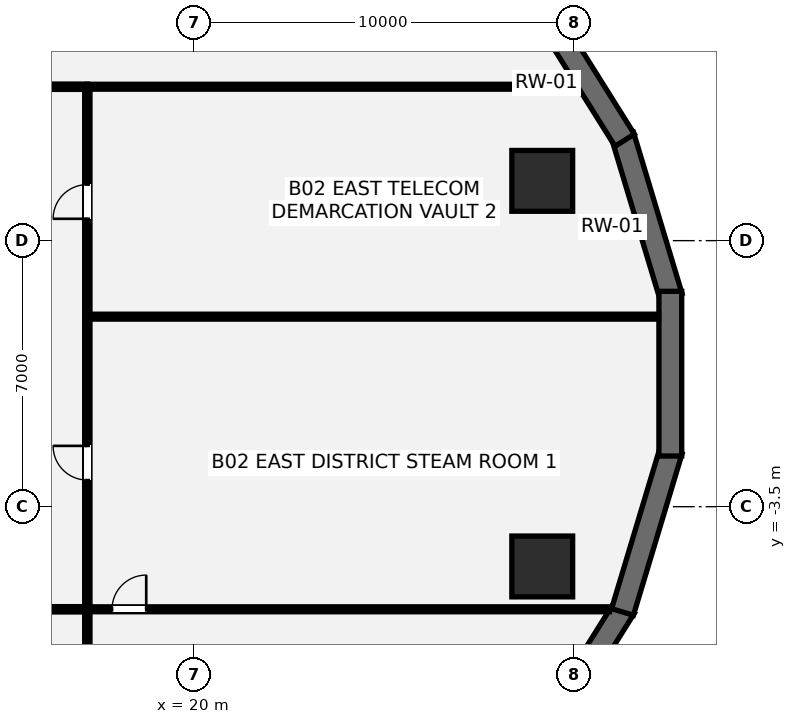
"""IFC4 building model, lengths in metres.
Left out: names, types, materials, properties, quantities, classifications, styles, units other than length and angle.
Written with IfcOpenShell. Run it as: python <this file> out.ifc"""

import sys

from ifc_helpers import new_model, si_unit, direction, frame, frame_2d, origin, origin_2d, place, context, subcontext, project, spatial, rectangle, hollow_circle, extrude, element, fill, save


model = new_model("IFC4")
c1 = context("Model", 3, precision=1e-05, world=origin(), true_north=direction((0.0, 1.0)))
c2 = subcontext(c1, "Body", "Model", "MODEL_VIEW")
j1 = project(units=[si_unit("LENGTHUNIT", "METRE"), si_unit("PLANEANGLEUNIT", "RADIAN")], contexts=[c1])
p1 = place(None, origin())
s1 = spatial("IfcSite", under=j1, at=p1, CompositionType="ELEMENT")
p2 = place(p1, origin())
s2 = spatial("IfcBuilding", under=s1, at=p2, CompositionType="ELEMENT")
p3 = place(p2, frame((0.0, 0.0, -8.8)))
s3 = spatial("IfcBuildingStorey", under=s2, at=p3, CompositionType="ELEMENT", Elevation=-8.8)
p4 = place(p3, frame((32.562, 2.021, 0.0), z_axis=(0.0, 0.0, 1.0), x_axis=(-0.288296686647, 0.95754113252, 0.0)))
e1 = element("IfcWall", 1, at=p4, inside=s3, PredefinedType="USERDEFINED", context=c2, shape_type="SweptSolid", body=[
    extrude(rectangle(XDim=4.438, YDim=0.6, at=frame_2d((2.219, 0.0))), origin(), (0.0, 0.0, 1.0), 4.4),
])
for number, where, z_axis, x_axis in (
    (2, (31.341, 6.143, 0.0), (0.0, 0.0, 1.0), (-0.531, 0.847, 0.0)),
    (3, (28.833, -10.142, 0.0), (0.0, 0.0, 1.0), (0.531, 0.847, 0.0)),
):
    element("IfcWall", number, at=place(p3, frame(where, z_axis=z_axis, x_axis=x_axis)), inside=s3, PredefinedType="USERDEFINED", context=c2, shape_type="SweptSolid", body=[
        extrude(rectangle(XDim=4.72, YDim=0.6, at=frame_2d((2.36, 0.0))), origin(), (0.0, 0.0, 1.0), 4.4),
    ])
p5 = place(p3, frame((31.283, -6.271, 0.0), z_axis=(0.0, 0.0, 1.0), x_axis=(0.288296686647, 0.95754113252, 0.0)))
e4 = element("IfcWall", 4, at=p5, inside=s3, PredefinedType="USERDEFINED", context=c2, shape_type="SweptSolid", body=[
    extrude(rectangle(XDim=4.438, YDim=0.6, at=frame_2d((2.219, 0.0))), origin(), (0.0, 0.0, 1.0), 4.4),
])
p6 = place(p3, frame((32.541, -2.167, 0.0), z_axis=(0.0, 0.0, 1.0), x_axis=(0.0, 1.0, 0.0)))
e5 = element("IfcWall", 5, at=p6, inside=s3, PredefinedType="USERDEFINED", context=c2, shape_type="SweptSolid", body=[
    extrude(rectangle(XDim=4.333, YDim=0.6, at=frame_2d((2.167, 0.0))), origin(), (0.0, 0.0, 1.0), 4.4),
])
for number, where, z_axis, x_axis in (
    (6, (29.171, 5.073, 0.0), (0.0, 0.0, 1.0), (1.0, 0.0, 0.0)),
    (7, (29.171, -5.073, 0.0), (0.0, 0.0, 1.0), (1.0, 0.0, 0.0)),
):
    element("IfcColumn", number, at=place(p3, frame(where, z_axis=z_axis, x_axis=x_axis)), inside=s3, PredefinedType="USERDEFINED", context=c2, shape_type="SweptSolid", body=[
        extrude(hollow_circle(Radius=0.8, WallThickness=0.06, at=origin_2d()), origin(), (0.0, 0.0, 1.0), 4.4),
    ])
p7 = place(p3, frame((-17.2, -6.2, 0.0), z_axis=(0.0, 0.0, 1.0), x_axis=(1.0, 0.0, 0.0)))
e8 = element("IfcWall", 8, at=p7, inside=s3, PredefinedType="PARTITIONING", context=c2, shape_type="SweptSolid", body=[
    extrude(rectangle(XDim=34.4, YDim=0.14, at=frame_2d((17.2, 0.0))), origin(), (0.0, 0.0, 1.0), 4.14),
])
p8 = place(p7, frame((5.15, 0.0, 0.0)))
e9 = element("IfcOpeningElement", 9, at=p8, cuts=e8, PredefinedType="OPENING", context=c2, shape_type="SweptSolid", body=[
    extrude(rectangle(XDim=0.9, YDim=2.1, at=frame_2d((0.45, 1.05))), frame((0.0, 0.08, 0.0), z_axis=(0.0, -1.0, 0.0), x_axis=(1.0, 0.0, 0.0)), (0.0, 0.0, 1.0), 0.16),
])
p9 = place(p7, frame((16.75, 0.0, 0.0)))
e10 = element("IfcOpeningElement", 10, at=p9, cuts=e8, PredefinedType="OPENING", context=c2, shape_type="SweptSolid", body=[
    extrude(rectangle(XDim=0.9, YDim=2.1, at=frame_2d((0.45, 1.05))), frame((0.0, 0.08, 0.0), z_axis=(0.0, -1.0, 0.0), x_axis=(1.0, 0.0, 0.0)), (0.0, 0.0, 1.0), 0.16),
])
p10 = place(p7, frame((28.35, 0.0, 0.0)))
e11 = element("IfcOpeningElement", 11, at=p10, cuts=e8, PredefinedType="OPENING", context=c2, shape_type="SweptSolid", body=[
    extrude(rectangle(XDim=0.9, YDim=2.1, at=frame_2d((0.45, 1.05))), frame((0.0, 0.08, 0.0), z_axis=(0.0, -1.0, 0.0), x_axis=(1.0, 0.0, 0.0)), (0.0, 0.0, 1.0), 0.16),
])
p11 = place(p3, frame((17.2, -17.836, 0.0), z_axis=(0.0, 0.0, 1.0), x_axis=(0.0, 1.0, 0.0)))
e12 = element("IfcWall", 12, at=p11, inside=s3, PredefinedType="PARTITIONING", context=c2, shape_type="SweptSolid", body=[
    extrude(rectangle(XDim=25.386, YDim=0.14, at=frame_2d((12.693, 0.0))), origin(), (0.0, 0.0, 1.0), 3.508),
])
p12 = place(p11, frame((15.036, 0.0, 0.0)))
e13 = element("IfcOpeningElement", 13, at=p12, cuts=e12, PredefinedType="OPENING", context=c2, shape_type="SweptSolid", body=[
    extrude(rectangle(XDim=0.9, YDim=2.1, at=frame_2d((0.45, 1.05))), frame((0.0, 0.08, 0.0), z_axis=(0.0, -1.0, 0.0), x_axis=(1.0, 0.0, 0.0)), (0.0, 0.0, 1.0), 0.16),
])
p13 = place(p11, frame((21.911, 0.0, 0.0)))
e14 = element("IfcOpeningElement", 14, at=p13, cuts=e12, PredefinedType="OPENING", context=c2, shape_type="SweptSolid", body=[
    extrude(rectangle(XDim=0.9, YDim=2.1, at=frame_2d((0.45, 1.05))), frame((0.0, 0.08, 0.0), z_axis=(0.0, -1.0, 0.0), x_axis=(1.0, 0.0, 0.0)), (0.0, 0.0, 1.0), 0.16),
])
p14 = place(p3, frame((14.05, 7.55, 0.0), z_axis=(0.0, 0.0, 1.0), x_axis=(1.0, 0.0, 0.0)))
e15 = element("IfcWall", 15, at=p14, inside=s3, PredefinedType="PARTITIONING", context=c2, shape_type="SweptSolid", body=[
    extrude(rectangle(XDim=3.15, YDim=0.14, at=frame_2d((1.575, 0.0))), origin(), (0.0, 0.0, 1.0), 4.14),
])
p15 = place(p14, frame((0.32, 0.0, 0.0)))
e16 = element("IfcOpeningElement", 16, at=p15, cuts=e15, PredefinedType="OPENING", context=c2, shape_type="SweptSolid", body=[
    extrude(rectangle(XDim=0.92, YDim=2.15, at=frame_2d((0.46, 1.075))), frame((0.0, 0.08, 0.0), z_axis=(0.0, -1.0, 0.0), x_axis=(1.0, 0.0, 0.0)), (0.0, 0.0, 1.0), 0.16),
])
p16 = place(p3, frame((17.2, 7.55, 0.0), z_axis=(0.0, 0.0, 1.0), x_axis=(1.0, 0.0, 0.0)))
e17 = element("IfcWall", 17, at=p16, inside=s3, PredefinedType="PARTITIONING", context=c2, shape_type="SweptSolid", body=[
    extrude(rectangle(XDim=12.895, YDim=0.13, at=frame_2d((6.448, 0.0))), origin(), (0.0, 0.0, 1.0), 3.118),
])
p17 = place(p3, frame((17.2, -6.2, 0.0), z_axis=(0.0, 0.0, 1.0), x_axis=(1.0, 0.0, 0.0)))
e18 = element("IfcWall", 18, at=p17, inside=s3, PredefinedType="PARTITIONING", context=c2, shape_type="SweptSolid", body=[
    extrude(rectangle(XDim=13.742, YDim=0.13, at=frame_2d((6.871, 0.0))), origin(), (0.0, 0.0, 1.0), 3.118),
])
p18 = place(p17, frame((0.65, 0.0, 0.0)))
e19 = element("IfcOpeningElement", 19, at=p18, cuts=e18, PredefinedType="OPENING", context=c2, shape_type="SweptSolid", body=[
    extrude(rectangle(XDim=0.9, YDim=2.1, at=frame_2d((0.45, 1.05))), frame((0.0, 0.075, 0.0), z_axis=(0.0, -1.0, 0.0), x_axis=(1.0, 0.0, 0.0)), (0.0, 0.0, 1.0), 0.15),
])
p19 = place(p3, frame((17.2, 1.5, 0.0), z_axis=(0.0, 0.0, 1.0), x_axis=(1.0, 0.0, 0.0)))
e20 = element("IfcWall", 20, at=p19, inside=s3, PredefinedType="PARTITIONING", context=c2, shape_type="SweptSolid", body=[
    extrude(rectangle(XDim=15.033, YDim=0.13, at=frame_2d((7.517, 0.0))), origin(), (0.0, 0.0, 1.0), 4.14),
])
p20 = place(p18, origin())
e21 = element("IfcDoor", 21, at=p20, inside=s3, OperationType="SINGLE_SWING_RIGHT", PredefinedType="DOOR", context=c2, shape_type="SweptSolid", body=[
    extrude(rectangle(XDim=0.9, YDim=2.1, at=frame_2d((0.45, 1.05))), frame((0.0, 0.025, 0.0), z_axis=(0.0, -1.0, 0.0), x_axis=(1.0, 0.0, 0.0)), (0.0, 0.0, 1.0), 0.05),
])
fill(e19, e21)
p21 = place(p12, origin())
e22 = element("IfcDoor", 22, at=p21, inside=s3, OperationType="SINGLE_SWING_RIGHT", PredefinedType="DOOR", context=c2, shape_type="SweptSolid", body=[
    extrude(rectangle(XDim=0.9, YDim=2.1, at=frame_2d((0.45, 1.05))), frame((0.0, 0.025, 0.0), z_axis=(0.0, -1.0, 0.0), x_axis=(1.0, 0.0, 0.0)), (0.0, 0.0, 1.0), 0.05),
])
fill(e13, e22)
p22 = place(p13, origin())
e23 = element("IfcDoor", 23, at=p22, inside=s3, OperationType="SINGLE_SWING_LEFT", PredefinedType="DOOR", context=c2, shape_type="SweptSolid", body=[
    extrude(rectangle(XDim=0.9, YDim=2.1, at=frame_2d((0.45, 1.05))), frame((0.0, 0.025, 0.0), z_axis=(0.0, -1.0, 0.0), x_axis=(1.0, 0.0, 0.0)), (0.0, 0.0, 1.0), 0.05),
])
fill(e14, e23)
save(model, sys.argv[1])
